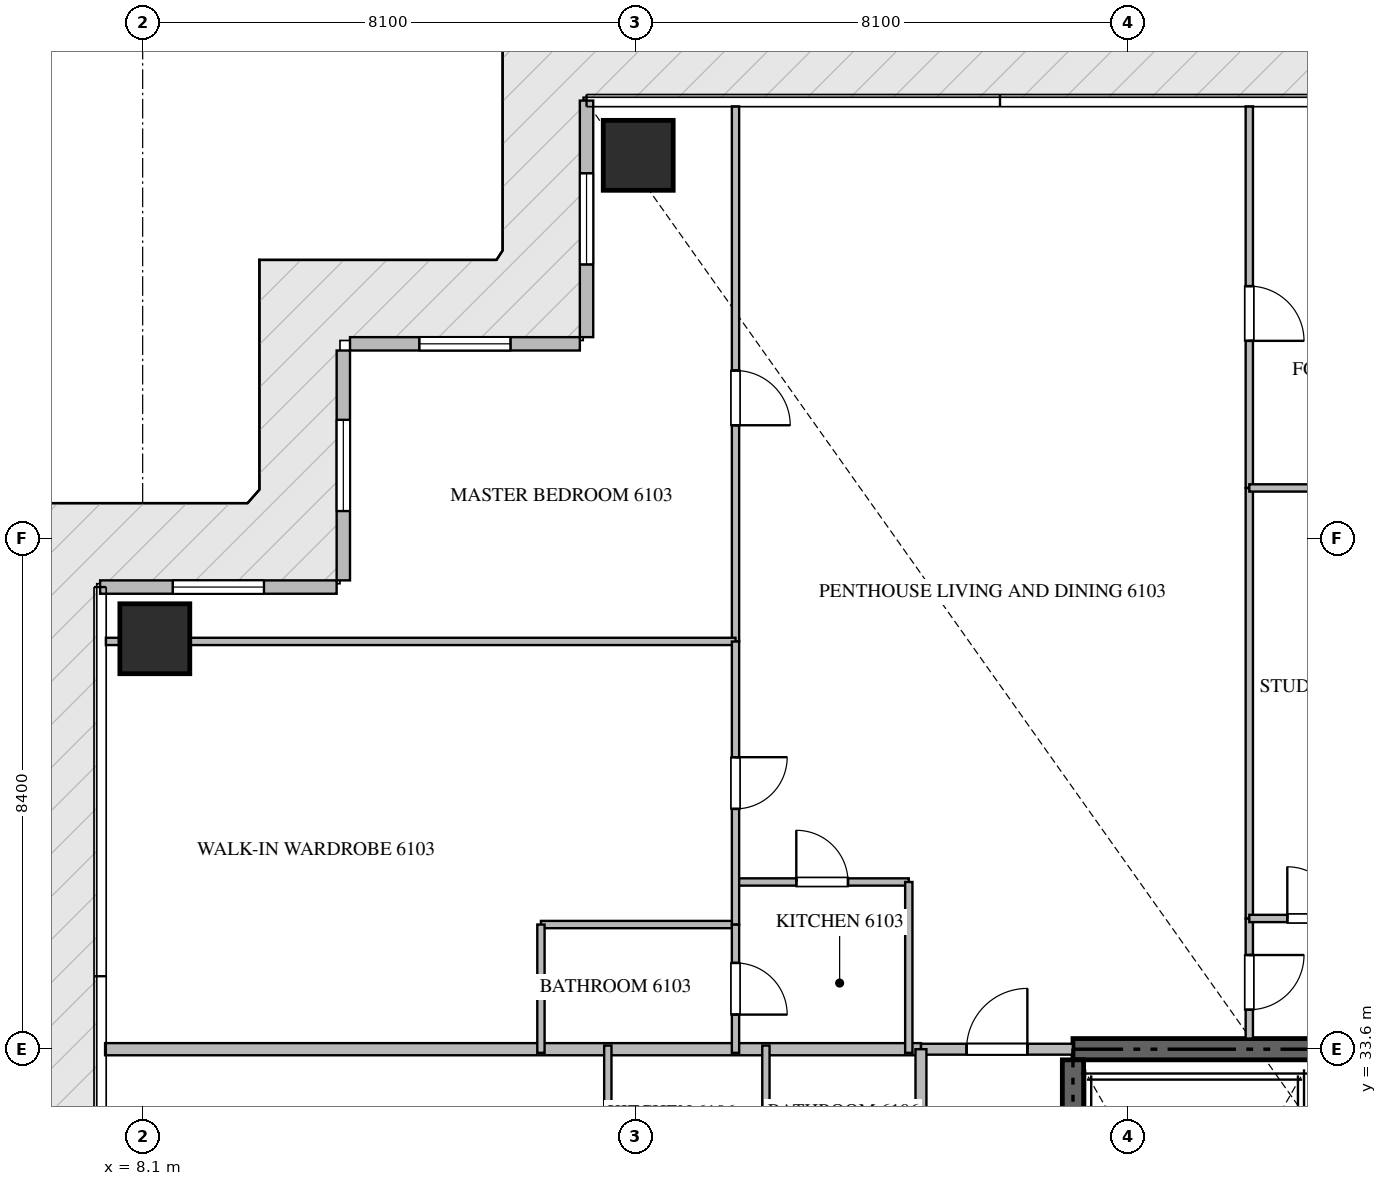
"""IFC4 building model, lengths in metres.
Left out: names, types, materials, properties, quantities, classifications, styles, units other than length and angle.
Written with IfcOpenShell. Run it as: python <this file> out.ifc"""

import sys

from ifc_helpers import new_model, si_unit, direction, frame, frame_2d, origin, origin_2d, place, context, subcontext, project, spatial, rectangle, extrude, source, transform, mapped, element, fill, save


model = new_model("IFC4")
c1 = context("Model", 3, precision=1e-05, world=origin(), true_north=direction((0.0, 1.0)))
c2 = subcontext(c1, "Body", "Model", "MODEL_VIEW")
j1 = project(units=[si_unit("LENGTHUNIT", "METRE"), si_unit("PLANEANGLEUNIT", "RADIAN")], contexts=[c1])
p1 = place(None, origin())
s1 = spatial("IfcSite", under=j1, at=p1, CompositionType="ELEMENT")
p2 = place(p1, origin())
s2 = spatial("IfcBuilding", under=s1, at=p2, CompositionType="ELEMENT")
p3 = place(p2, frame((0.0, 0.0, 245.1)))
s3 = spatial("IfcBuildingStorey", under=s2, at=p3, CompositionType="ELEMENT", Elevation=245.1)
p4 = place(p3, frame((41.4, 33.6, -0.26), z_axis=(0.0, 0.0, 1.0), x_axis=(-1.0, 0.0, 0.0)))
e1 = element("IfcWall", 1, at=p4, inside=s3, PredefinedType="SHEAR", context=c2, shape_type="SweptSolid", body=[
    extrude(rectangle(XDim=18.0, YDim=0.35, at=frame_2d((9.0, 0.0))), origin(), (0.0, 0.0, 1.0), 3.848),
])
p5 = place(p3, frame((23.4, 24.25, -0.26), z_axis=(0.0, 0.0, 1.0), x_axis=(0.0, 1.0, 0.0)))
e2 = element("IfcWall", 2, at=p5, inside=s3, PredefinedType="SHEAR", context=c2, shape_type="SweptSolid", body=[
    extrude(rectangle(XDim=9.175, YDim=0.35, at=frame_2d((4.587, 0.0))), origin(), (0.0, 0.0, 1.0), 3.848),
])
m1 = source(origin(), c2, "Body", "SweptSolid", [
    extrude(rectangle(XDim=1.15, YDim=1.15, at=origin_2d()), origin(), (0.0, 0.0, 1.0), 3.85),
])
for number, where, z_axis, x_axis in (
    (3, (16.25, 48.3, -0.26), (0.0, 0.0, 1.0), (1.0, 0.0, 0.0)),
    (4, (8.3, 40.35, -0.26), (0.0, 0.0, 1.0), (1.0, 0.0, 0.0)),
):
    element("IfcColumn", number, at=place(p3, frame(where, z_axis=z_axis, x_axis=x_axis)), inside=s3, PredefinedType="COLUMN", context=c2, shape_type="MappedRepresentation", body=[
        mapped(m1, transform((0.0, 0.0, 0.0), scale=1.0)),
    ])
p6 = place(p3, frame((15.4, 49.2, 0.0), z_axis=(0.0, 0.0, 1.0), x_axis=(0.0, -1.0, 0.0)))
e5 = element("IfcWall", 5, at=p6, inside=s3, PredefinedType="ELEMENTEDWALL", context=c2, shape_type="SweptSolid", body=[
    extrude(rectangle(XDim=3.89, YDim=0.22, at=frame_2d((1.945, 0.0))), origin(), (0.0, 0.0, 1.0), 3.575),
])
p7 = place(p6, frame((1.195, 0.0, 0.65)))
e6 = element("IfcOpeningElement", 6, at=p7, cuts=e5, PredefinedType="OPENING", context=c2, shape_type="SweptSolid", body=[
    extrude(rectangle(XDim=1.5, YDim=2.25, at=frame_2d((0.75, 1.125))), frame((0.0, 0.12, 0.0), z_axis=(0.0, -1.0, 0.0), x_axis=(1.0, 0.0, 0.0)), (0.0, 0.0, 1.0), 0.24),
])
p8 = place(p3, frame((15.29, 45.2, 0.0), z_axis=(0.0, 0.0, 1.0), x_axis=(-1.0, 0.0, 0.0)))
e7 = element("IfcWall", 7, at=p8, inside=s3, PredefinedType="ELEMENTEDWALL", context=c2, shape_type="SweptSolid", body=[
    extrude(rectangle(XDim=3.78, YDim=0.22, at=frame_2d((1.89, 0.0))), origin(), (0.0, 0.0, 1.0), 3.575),
])
p9 = place(p8, frame((1.14, 0.0, 0.65)))
e8 = element("IfcOpeningElement", 8, at=p9, cuts=e7, PredefinedType="OPENING", context=c2, shape_type="SweptSolid", body=[
    extrude(rectangle(XDim=1.5, YDim=2.25, at=frame_2d((0.75, 1.125))), frame((0.0, 0.12, 0.0), z_axis=(0.0, -1.0, 0.0), x_axis=(1.0, 0.0, 0.0)), (0.0, 0.0, 1.0), 0.24),
])
p10 = place(p3, frame((11.4, 45.09, 0.0), z_axis=(0.0, 0.0, 1.0), x_axis=(0.0, -1.0, 0.0)))
e9 = element("IfcWall", 9, at=p10, inside=s3, PredefinedType="ELEMENTEDWALL", context=c2, shape_type="SweptSolid", body=[
    extrude(rectangle(XDim=3.78, YDim=0.22, at=frame_2d((1.89, 0.0))), origin(), (0.0, 0.0, 1.0), 3.575),
])
p11 = place(p10, frame((1.14, 0.0, 0.65)))
e10 = element("IfcOpeningElement", 10, at=p11, cuts=e9, PredefinedType="OPENING", context=c2, shape_type="SweptSolid", body=[
    extrude(rectangle(XDim=1.5, YDim=2.25, at=frame_2d((0.75, 1.125))), frame((0.0, 0.12, 0.0), z_axis=(0.0, -1.0, 0.0), x_axis=(1.0, 0.0, 0.0)), (0.0, 0.0, 1.0), 0.24),
])
p12 = place(p3, frame((11.29, 41.2, 0.0), z_axis=(0.0, 0.0, 1.0), x_axis=(-1.0, 0.0, 0.0)))
e11 = element("IfcWall", 11, at=p12, inside=s3, PredefinedType="ELEMENTEDWALL", context=c2, shape_type="SweptSolid", body=[
    extrude(rectangle(XDim=3.89, YDim=0.22, at=frame_2d((1.945, 0.0))), origin(), (0.0, 0.0, 1.0), 3.575),
])
p13 = place(p12, frame((1.195, 0.0, 0.65)))
e12 = element("IfcOpeningElement", 12, at=p13, cuts=e11, PredefinedType="OPENING", context=c2, shape_type="SweptSolid", body=[
    extrude(rectangle(XDim=1.5, YDim=2.25, at=frame_2d((0.75, 1.125))), frame((0.0, 0.12, 0.0), z_axis=(0.0, -1.0, 0.0), x_axis=(1.0, 0.0, 0.0)), (0.0, 0.0, 1.0), 0.24),
])
p14 = place(p3, frame((7.482, 33.6, 0.0), z_axis=(0.0, 0.0, 1.0), x_axis=(1.0, 0.0, 0.0)))
e13 = element("IfcWall", 13, at=p14, inside=s3, PredefinedType="PARTITIONING", context=c2, shape_type="SweptSolid", body=[
    extrude(rectangle(XDim=13.418, YDim=0.2, at=frame_2d((6.709, 0.0))), origin(), (0.0, 0.0, 1.0), 3.59),
])
p15 = place(p3, frame((20.902, 33.6, 0.0), z_axis=(0.0, 0.0, 1.0), x_axis=(1.0, 0.0, 0.0)))
e14 = element("IfcWall", 14, at=p15, inside=s3, PredefinedType="PARTITIONING", context=c2, shape_type="SweptSolid", body=[
    extrude(rectangle(XDim=2.496, YDim=0.18, at=frame_2d((1.248, 0.0))), origin(), (0.0, 0.0, 1.0), 3.59),
])
p16 = place(p15, frame((0.748, 0.0, 0.0)))
e15 = element("IfcOpeningElement", 15, at=p16, cuts=e14, PredefinedType="OPENING", context=c2, shape_type="SweptSolid", body=[
    extrude(rectangle(XDim=1.0, YDim=2.15, at=frame_2d((0.5, 1.075))), frame((0.0, 0.1, 0.0), z_axis=(0.0, -1.0, 0.0), x_axis=(1.0, 0.0, 0.0)), (0.0, 0.0, 1.0), 0.2),
])
p17 = place(p3, frame((20.9, 16.8, 0.0), z_axis=(0.0, 0.0, 1.0), x_axis=(0.0, 1.0, 0.0)))
e16 = element("IfcWall", 16, at=p17, inside=s3, PredefinedType="PARTITIONING", context=c2, shape_type="SweptSolid", body=[
    extrude(rectangle(XDim=16.8, YDim=0.18, at=frame_2d((8.4, 0.0))), origin(), (0.0, 0.0, 1.0), 3.59),
])
p18 = place(p17, frame((2.67, 0.0, 0.0)))
e17 = element("IfcOpeningElement", 17, at=p18, cuts=e16, PredefinedType="OPENING", context=c2, shape_type="SweptSolid", body=[
    extrude(rectangle(XDim=1.0, YDim=2.15, at=frame_2d((0.5, 1.075))), frame((0.0, 0.1, 0.0), z_axis=(0.0, -1.0, 0.0), x_axis=(1.0, 0.0, 0.0)), (0.0, 0.0, 1.0), 0.2),
])
p19 = place(p17, frame((11.107, 0.0, 0.0)))
e18 = element("IfcOpeningElement", 18, at=p19, cuts=e16, PredefinedType="OPENING", context=c2, shape_type="SweptSolid", body=[
    extrude(rectangle(XDim=1.0, YDim=2.15, at=frame_2d((0.5, 1.075))), frame((0.0, 0.1, 0.0), z_axis=(0.0, -1.0, 0.0), x_axis=(1.0, 0.0, 0.0)), (0.0, 0.0, 1.0), 0.2),
])
p20 = place(p3, frame((17.85, 36.35, 0.0), z_axis=(0.0, 0.0, 1.0), x_axis=(1.0, 0.0, 0.0)))
e19 = element("IfcWall", 19, at=p20, inside=s3, PredefinedType="PARTITIONING", context=c2, shape_type="SweptSolid", body=[
    extrude(rectangle(XDim=2.85, YDim=0.12, at=frame_2d((1.425, 0.0))), origin(), (0.0, 0.0, 1.0), 3.59),
])
p21 = place(p20, frame((1.0, 0.0, 0.0)))
e20 = element("IfcOpeningElement", 20, at=p21, cuts=e19, PredefinedType="OPENING", context=c2, shape_type="SweptSolid", body=[
    extrude(rectangle(XDim=0.85, YDim=2.1, at=frame_2d((0.425, 1.05))), frame((0.0, 0.07, 0.0), z_axis=(0.0, -1.0, 0.0), x_axis=(1.0, 0.0, 0.0)), (0.0, 0.0, 1.0), 0.14),
])
p22 = place(p3, frame((20.7, 36.35, 0.0), z_axis=(0.0, 0.0, 1.0), x_axis=(0.0, -1.0, 0.0)))
e21 = element("IfcWall", 21, at=p22, inside=s3, PredefinedType="PARTITIONING", context=c2, shape_type="SweptSolid", body=[
    extrude(rectangle(XDim=2.81, YDim=0.12, at=frame_2d((1.405, 0.0))), origin(), (0.0, 0.0, 1.0), 3.59),
])
p23 = place(p3, frame((17.85, 49.105, 0.0), z_axis=(0.0, 0.0, 1.0), x_axis=(0.0, -1.0, 0.0)))
e22 = element("IfcWall", 22, at=p23, inside=s3, PredefinedType="PARTITIONING", context=c2, shape_type="SweptSolid", body=[
    extrude(rectangle(XDim=8.799, YDim=0.12, at=frame_2d((4.399, 0.0))), origin(), (0.0, 0.0, 1.0), 3.59),
])
p24 = place(p23, frame((4.344, 0.0, 0.0)))
e23 = element("IfcOpeningElement", 23, at=p24, cuts=e22, PredefinedType="OPENING", context=c2, shape_type="SweptSolid", body=[
    extrude(rectangle(XDim=0.9, YDim=2.1, at=frame_2d((0.45, 1.05))), frame((0.0, 0.07, 0.0), z_axis=(0.0, -1.0, 0.0), x_axis=(1.0, 0.0, 0.0)), (0.0, 0.0, 1.0), 0.14),
])
p25 = place(p3, frame((7.495, 40.306, 0.0), z_axis=(0.0, 0.0, 1.0), x_axis=(1.0, 0.0, 0.0)))
e24 = element("IfcWall", 24, at=p25, inside=s3, PredefinedType="PARTITIONING", context=c2, shape_type="SweptSolid", body=[
    extrude(rectangle(XDim=10.355, YDim=0.12, at=frame_2d((5.177, 0.0))), origin(), (0.0, 0.0, 1.0), 3.122),
])
p26 = place(p3, frame((14.65, 35.65, 0.0), z_axis=(0.0, 0.0, 1.0), x_axis=(1.0, 0.0, 0.0)))
e25 = element("IfcWall", 25, at=p26, inside=s3, PredefinedType="PARTITIONING", context=c2, shape_type="SweptSolid", body=[
    extrude(rectangle(XDim=3.2, YDim=0.12, at=frame_2d((1.6, 0.0))), origin(), (0.0, 0.0, 1.0), 3.59),
])
p27 = place(p3, frame((14.65, 35.65, 0.0), z_axis=(0.0, 0.0, 1.0), x_axis=(0.0, -1.0, 0.0)))
e26 = element("IfcWall", 26, at=p27, inside=s3, PredefinedType="PARTITIONING", context=c2, shape_type="SweptSolid", body=[
    extrude(rectangle(XDim=2.11, YDim=0.12, at=frame_2d((1.055, 0.0))), origin(), (0.0, 0.0, 1.0), 3.59),
])
p28 = place(p3, frame((17.85, 40.304, 0.0), z_axis=(0.0, 0.0, 1.0), x_axis=(0.0, -1.0, 0.0)))
e27 = element("IfcWall", 27, at=p28, inside=s3, PredefinedType="PARTITIONING", context=c2, shape_type="SweptSolid", body=[
    extrude(rectangle(XDim=4.654, YDim=0.12, at=frame_2d((2.327, 0.0))), origin(), (0.0, 0.0, 1.0), 3.59),
])
p29 = place(p28, frame((1.902, 0.0, 0.0)))
e28 = element("IfcOpeningElement", 28, at=p29, cuts=e27, PredefinedType="OPENING", context=c2, shape_type="SweptSolid", body=[
    extrude(rectangle(XDim=0.85, YDim=2.1, at=frame_2d((0.425, 1.05))), frame((0.0, 0.07, 0.0), z_axis=(0.0, -1.0, 0.0), x_axis=(1.0, 0.0, 0.0)), (0.0, 0.0, 1.0), 0.14),
])
p30 = place(p3, frame((17.85, 35.648, 0.0), z_axis=(0.0, 0.0, 1.0), x_axis=(0.0, -1.0, 0.0)))
e29 = element("IfcWall", 29, at=p30, inside=s3, PredefinedType="PARTITIONING", context=c2, shape_type="SweptSolid", body=[
    extrude(rectangle(XDim=2.108, YDim=0.12, at=frame_2d((1.054, 0.0))), origin(), (0.0, 0.0, 1.0), 3.59),
])
p31 = place(p30, frame((0.629, 0.0, 0.0)))
e30 = element("IfcOpeningElement", 30, at=p31, cuts=e29, PredefinedType="OPENING", context=c2, shape_type="SweptSolid", body=[
    extrude(rectangle(XDim=0.85, YDim=2.1, at=frame_2d((0.425, 1.05))), frame((0.0, 0.07, 0.0), z_axis=(0.0, -1.0, 0.0), x_axis=(1.0, 0.0, 0.0)), (0.0, 0.0, 1.0), 0.14),
])
p32 = place(p3, frame((26.3, 35.75, 0.0), z_axis=(0.0, 0.0, 1.0), x_axis=(0.0, -1.0, 0.0)))
e31 = element("IfcWall", 31, at=p32, inside=s3, PredefinedType="PARTITIONING", context=c2, shape_type="SweptSolid", body=[
    extrude(rectangle(XDim=1.975, YDim=0.12, at=frame_2d((0.988, 0.0))), origin(), (0.0, 0.0, 1.0), 3.59),
])
p33 = place(p32, frame((0.601, 0.0, 0.0)))
e32 = element("IfcOpeningElement", 32, at=p33, cuts=e31, PredefinedType="OPENING", context=c2, shape_type="SweptSolid", body=[
    extrude(rectangle(XDim=0.9, YDim=2.1, at=frame_2d((0.45, 1.05))), frame((0.0, 0.07, 0.0), z_axis=(0.0, -1.0, 0.0), x_axis=(1.0, 0.0, 0.0)), (0.0, 0.0, 1.0), 0.14),
])
p34 = place(p3, frame((26.3, 49.105, 0.0), z_axis=(0.0, 0.0, 1.0), x_axis=(0.0, -1.0, 0.0)))
e33 = element("IfcWall", 33, at=p34, inside=s3, PredefinedType="PARTITIONING", context=c2, shape_type="SweptSolid", body=[
    extrude(rectangle(XDim=6.275, YDim=0.12, at=frame_2d((3.137, 0.0))), origin(), (0.0, 0.0, 1.0), 3.59),
])
p35 = place(p34, frame((2.956, 0.0, 0.0)))
e34 = element("IfcOpeningElement", 34, at=p35, cuts=e33, PredefinedType="OPENING", context=c2, shape_type="SweptSolid", body=[
    extrude(rectangle(XDim=0.9, YDim=2.1, at=frame_2d((0.45, 1.05))), frame((0.0, 0.07, 0.0), z_axis=(0.0, -1.0, 0.0), x_axis=(1.0, 0.0, 0.0)), (0.0, 0.0, 1.0), 0.14),
])
p36 = place(p3, frame((26.3, 42.828, 0.0), z_axis=(0.0, 0.0, 1.0), x_axis=(0.0, -1.0, 0.0)))
e35 = element("IfcWall", 35, at=p36, inside=s3, PredefinedType="PARTITIONING", context=c2, shape_type="SweptSolid", body=[
    extrude(rectangle(XDim=7.076, YDim=0.12, at=frame_2d((3.538, 0.0))), origin(), (0.0, 0.0, 1.0), 3.59),
])
p37 = place(p3, frame((26.3, 42.83, 0.0), z_axis=(0.0, 0.0, 1.0), x_axis=(1.0, 0.0, 0.0)))
e36 = element("IfcWall", 36, at=p37, inside=s3, PredefinedType="PARTITIONING", context=c2, shape_type="SweptSolid", body=[
    extrude(rectangle(XDim=5.15, YDim=0.12, at=frame_2d((2.575, 0.0))), origin(), (0.0, 0.0, 1.0), 3.59),
])
p38 = place(p3, frame((26.3, 35.75, 0.0), z_axis=(0.0, 0.0, 1.0), x_axis=(1.0, 0.0, 0.0)))
e37 = element("IfcWall", 37, at=p38, inside=s3, PredefinedType="PARTITIONING", context=c2, shape_type="SweptSolid", body=[
    extrude(rectangle(XDim=2.1, YDim=0.12, at=frame_2d((1.05, 0.0))), origin(), (0.0, 0.0, 1.0), 3.59),
])
p39 = place(p38, frame((0.625, 0.0, 0.0)))
e38 = element("IfcOpeningElement", 38, at=p39, cuts=e37, PredefinedType="OPENING", context=c2, shape_type="SweptSolid", body=[
    extrude(rectangle(XDim=0.85, YDim=2.1, at=frame_2d((0.425, 1.05))), frame((0.0, 0.07, 0.0), z_axis=(0.0, -1.0, 0.0), x_axis=(1.0, 0.0, 0.0)), (0.0, 0.0, 1.0), 0.14),
])
for number, where, z_axis, x_axis in (
    (39, (18.35, 31.0, 0.0), (0.0, 0.0, 1.0), (0.0, 1.0, 0.0)),
    (40, (15.75, 31.0, 0.0), (0.0, 0.0, 1.0), (0.0, 1.0, 0.0)),
):
    element("IfcWall", number, at=place(p3, frame(where, z_axis=z_axis, x_axis=x_axis)), inside=s3, PredefinedType="PARTITIONING", context=c2, shape_type="SweptSolid", body=[
        extrude(rectangle(XDim=2.66, YDim=0.12, at=frame_2d((1.33, 0.0))), origin(), (0.0, 0.0, 1.0), 3.59),
    ])
m2 = source(origin(), c2, "Body", "SweptSolid", [
    extrude(rectangle(XDim=1.5, YDim=2.25, at=frame_2d((0.75, 1.125))), frame((0.0, 0.03, 0.0), z_axis=(0.0, -1.0, 0.0), x_axis=(1.0, 0.0, 0.0)), (0.0, 0.0, 1.0), 0.06),
])
p40 = place(p7, origin())
e41 = element("IfcWindow", 41, at=p40, inside=s3, PartitioningType="SINGLE_PANEL", PredefinedType="WINDOW", context=c2, shape_type="MappedRepresentation", body=[
    mapped(m2, transform((0.0, 0.0, 0.0), scale=1.0)),
])
fill(e6, e41)
p41 = place(p9, origin())
e42 = element("IfcWindow", 42, at=p41, inside=s3, PartitioningType="SINGLE_PANEL", PredefinedType="WINDOW", context=c2, shape_type="MappedRepresentation", body=[
    mapped(m2, transform((0.0, 0.0, 0.0), scale=1.0)),
])
fill(e8, e42)
p42 = place(p11, origin())
e43 = element("IfcWindow", 43, at=p42, inside=s3, PartitioningType="SINGLE_PANEL", PredefinedType="WINDOW", context=c2, shape_type="MappedRepresentation", body=[
    mapped(m2, transform((0.0, 0.0, 0.0), scale=1.0)),
])
fill(e10, e43)
p43 = place(p13, origin())
e44 = element("IfcWindow", 44, at=p43, inside=s3, PartitioningType="SINGLE_PANEL", PredefinedType="WINDOW", context=c2, shape_type="MappedRepresentation", body=[
    mapped(m2, transform((0.0, 0.0, 0.0), scale=1.0)),
])
fill(e12, e44)
m3 = source(origin(), c2, "Body", "SweptSolid", [
    extrude(rectangle(XDim=1.0, YDim=2.15, at=frame_2d((0.5, 1.075))), frame((0.0, 0.025, 0.0), z_axis=(0.0, -1.0, 0.0), x_axis=(1.0, 0.0, 0.0)), (0.0, 0.0, 1.0), 0.05),
])
p44 = place(p16, origin())
e45 = element("IfcDoor", 45, at=p44, inside=s3, OperationType="SINGLE_SWING_RIGHT", PredefinedType="DOOR", context=c2, shape_type="MappedRepresentation", body=[
    mapped(m3, transform((0.0, 0.0, 0.0), scale=1.0)),
])
fill(e15, e45)
m4 = source(origin(), c2, "Body", "SweptSolid", [
    extrude(rectangle(XDim=0.85, YDim=2.1, at=frame_2d((0.425, 1.05))), frame((0.0, 0.025, 0.0), z_axis=(0.0, -1.0, 0.0), x_axis=(1.0, 0.0, 0.0)), (0.0, 0.0, 1.0), 0.05),
])
p45 = place(p21, origin())
e46 = element("IfcDoor", 46, at=p45, inside=s3, OperationType="SINGLE_SWING_LEFT", PredefinedType="DOOR", context=c2, shape_type="MappedRepresentation", body=[
    mapped(m4, transform((0.0, 0.0, 0.0), scale=1.0)),
])
fill(e20, e46)
m5 = source(origin(), c2, "Body", "SweptSolid", [
    extrude(rectangle(XDim=0.9, YDim=2.1, at=frame_2d((0.45, 1.05))), frame((0.0, 0.025, 0.0), z_axis=(0.0, -1.0, 0.0), x_axis=(1.0, 0.0, 0.0)), (0.0, 0.0, 1.0), 0.05),
])
p46 = place(p24, origin())
e47 = element("IfcDoor", 47, at=p46, inside=s3, OperationType="SINGLE_SWING_RIGHT", PredefinedType="DOOR", context=c2, shape_type="MappedRepresentation", body=[
    mapped(m5, transform((0.0, 0.0, 0.0), scale=1.0)),
])
fill(e23, e47)
p47 = place(p29, origin())
e48 = element("IfcDoor", 48, at=p47, inside=s3, OperationType="SINGLE_SWING_LEFT", PredefinedType="DOOR", context=c2, shape_type="MappedRepresentation", body=[
    mapped(m4, transform((0.0, 0.0, 0.0), scale=1.0)),
])
fill(e28, e48)
p48 = place(p31, origin())
e49 = element("IfcDoor", 49, at=p48, inside=s3, OperationType="SINGLE_SWING_RIGHT", PredefinedType="DOOR", context=c2, shape_type="MappedRepresentation", body=[
    mapped(m4, transform((0.0, 0.0, 0.0), scale=1.0)),
])
fill(e30, e49)
p49 = place(p33, origin())
e50 = element("IfcDoor", 50, at=p49, inside=s3, OperationType="SINGLE_SWING_LEFT", PredefinedType="DOOR", context=c2, shape_type="MappedRepresentation", body=[
    mapped(m5, transform((0.0, 0.0, 0.0), scale=1.0)),
])
fill(e32, e50)
p50 = place(p35, origin())
e51 = element("IfcDoor", 51, at=p50, inside=s3, OperationType="SINGLE_SWING_RIGHT", PredefinedType="DOOR", context=c2, shape_type="MappedRepresentation", body=[
    mapped(m5, transform((0.0, 0.0, 0.0), scale=1.0)),
])
fill(e34, e51)
p51 = place(p39, origin())
e52 = element("IfcDoor", 52, at=p51, inside=s3, OperationType="SINGLE_SWING_LEFT", PredefinedType="DOOR", context=c2, shape_type="MappedRepresentation", body=[
    mapped(m4, transform((0.0, 0.0, 0.0), scale=1.0)),
])
fill(e38, e52)
save(model, sys.argv[1])
